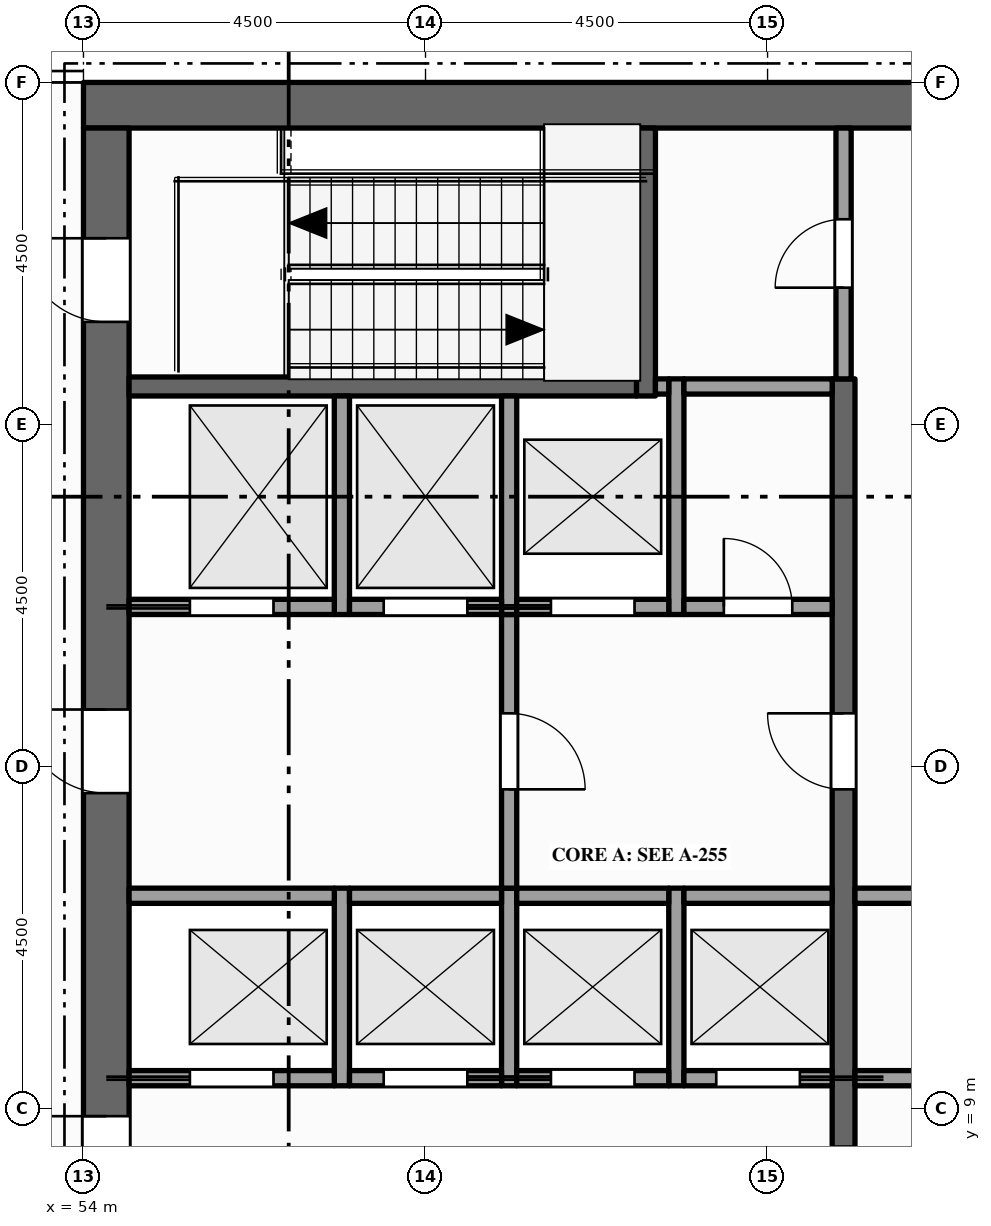
"""IFC4 building model, lengths in metres.
Left out: names, types, materials, properties, quantities, classifications, styles, units other than length and angle.
Written with IfcOpenShell. Run it as: python <this file> out.ifc"""

import sys

from ifc_helpers import new_model, si_unit, direction, frame, frame_2d, origin, place, context, subcontext, project, spatial, rectangle, extrude, element, fill, save


model = new_model("IFC4")
c1 = context("Model", 3, precision=1e-05, world=origin(), true_north=direction((0.0, 1.0)))
c2 = subcontext(c1, "Body", "Model", "MODEL_VIEW")
j1 = project(units=[si_unit("LENGTHUNIT", "METRE"), si_unit("PLANEANGLEUNIT", "RADIAN")], contexts=[c1])
p1 = place(None, origin())
s1 = spatial("IfcSite", under=j1, at=p1, CompositionType="ELEMENT")
p2 = place(p1, origin())
s2 = spatial("IfcBuilding", under=s1, at=p2, CompositionType="ELEMENT")
p3 = place(p2, frame((0.0, 0.0, 309.5)))
s3 = spatial("IfcBuildingStorey", under=s2, at=p3, CompositionType="ELEMENT", Elevation=309.5)
p4 = place(p3, frame((54.0, 22.2, -0.15), z_axis=(0.0, 0.0, 1.0), x_axis=(1.0, 0.0, 0.0)))
e1 = element("IfcWall", 1, at=p4, inside=s3, PredefinedType="SHEAR", context=c2, shape_type="SweptSolid", body=[
    extrude(rectangle(XDim=13.5, YDim=0.6, at=frame_2d((6.75, 0.0))), origin(), (0.0, 0.0, 1.0), 4.5),
])
p5 = place(p3, frame((54.3, 0.6, -0.15), z_axis=(0.0, 0.0, 1.0), x_axis=(0.0, 1.0, 0.0)))
e2 = element("IfcWall", 2, at=p5, inside=s3, PredefinedType="SHEAR", context=c2, shape_type="SweptSolid", body=[
    extrude(rectangle(XDim=21.3, YDim=0.6, at=frame_2d((10.65, 0.0))), origin(), (0.0, 0.0, 1.0), 4.5),
])
p6 = place(p5, frame((6.5, 0.0, 0.15)))
e3 = element("IfcOpeningElement", 3, at=p6, cuts=e2, PredefinedType="OPENING", context=c2, shape_type="SweptSolid", body=[
    extrude(rectangle(XDim=1.8, YDim=2.1, at=frame_2d((0.9, 1.05))), frame((0.0, 0.31, 0.0), z_axis=(0.0, -1.0, 0.0), x_axis=(1.0, 0.0, 0.0)), (0.0, 0.0, 1.0), 0.62),
])
p7 = place(p5, frame((12.55, 0.0, 0.15)))
e4 = element("IfcOpeningElement", 4, at=p7, cuts=e2, PredefinedType="OPENING", context=c2, shape_type="SweptSolid", body=[
    extrude(rectangle(XDim=1.1, YDim=2.1, at=frame_2d((0.55, 1.05))), frame((0.0, 0.31, 0.0), z_axis=(0.0, -1.0, 0.0), x_axis=(1.0, 0.0, 0.0)), (0.0, 0.0, 1.0), 0.62),
])
p8 = place(p5, frame((1.55, 0.0, 0.15)))
e5 = element("IfcOpeningElement", 5, at=p8, cuts=e2, PredefinedType="OPENING", context=c2, shape_type="SweptSolid", body=[
    extrude(rectangle(XDim=1.1, YDim=2.1, at=frame_2d((0.55, 1.05))), frame((0.0, 0.31, 0.0), z_axis=(0.0, -1.0, 0.0), x_axis=(1.0, 0.0, 0.0)), (0.0, 0.0, 1.0), 0.62),
])
p9 = place(p5, frame((18.75, 0.0, 0.15)))
e6 = element("IfcOpeningElement", 6, at=p9, cuts=e2, PredefinedType="OPENING", context=c2, shape_type="SweptSolid", body=[
    extrude(rectangle(XDim=1.1, YDim=2.1, at=frame_2d((0.55, 1.05))), frame((0.0, 0.31, 0.0), z_axis=(0.0, -1.0, 0.0), x_axis=(1.0, 0.0, 0.0)), (0.0, 0.0, 1.0), 0.62),
])
p10 = place(p3, frame((57.4, 9.3, 0.0), z_axis=(0.0, 0.0, 1.0), x_axis=(0.0, 1.0, 0.0)))
e7 = element("IfcWall", 7, at=p10, inside=s3, PredefinedType="SOLIDWALL", context=c2, shape_type="SweptSolid", body=[
    extrude(rectangle(XDim=2.6, YDim=0.2, at=frame_2d((1.3, 0.0))), origin(), (0.0, 0.0, 1.0), 4.35),
])
p11 = place(p3, frame((57.4, 15.5, 0.0), z_axis=(0.0, 0.0, 1.0), x_axis=(0.0, 1.0, 0.0)))
e8 = element("IfcWall", 8, at=p11, inside=s3, PredefinedType="SOLIDWALL", context=c2, shape_type="SweptSolid", body=[
    extrude(rectangle(XDim=2.875, YDim=0.2, at=frame_2d((1.438, 0.0))), origin(), (0.0, 0.0, 1.0), 4.35),
])
p12 = place(p3, frame((59.6, 9.3, 0.0), z_axis=(0.0, 0.0, 1.0), x_axis=(0.0, 1.0, 0.0)))
e9 = element("IfcWall", 9, at=p12, inside=s3, PredefinedType="SOLIDWALL", context=c2, shape_type="SweptSolid", body=[
    extrude(rectangle(XDim=2.6, YDim=0.2, at=frame_2d((1.3, 0.0))), origin(), (0.0, 0.0, 1.0), 4.35),
])
p13 = place(p3, frame((59.6, 11.9, 0.0), z_axis=(0.0, 0.0, 1.0), x_axis=(0.0, 1.0, 0.0)))
e10 = element("IfcWall", 10, at=p13, inside=s3, PredefinedType="PARTITIONING", context=c2, shape_type="SweptSolid", body=[
    extrude(rectangle(XDim=3.6, YDim=0.2, at=frame_2d((1.8, 0.0))), origin(), (0.0, 0.0, 1.0), 4.35),
])
p14 = place(p13, frame((1.3, 0.0, 0.0)))
e11 = element("IfcOpeningElement", 11, at=p14, cuts=e10, PredefinedType="OPENING", context=c2, shape_type="SweptSolid", body=[
    extrude(rectangle(XDim=1.0, YDim=2.1, at=frame_2d((0.5, 1.05))), frame((0.0, 0.11, 0.0), z_axis=(0.0, -1.0, 0.0), x_axis=(1.0, 0.0, 0.0)), (0.0, 0.0, 1.0), 0.22),
])
p15 = place(p3, frame((59.6, 15.5, 0.0), z_axis=(0.0, 0.0, 1.0), x_axis=(0.0, 1.0, 0.0)))
e12 = element("IfcWall", 12, at=p15, inside=s3, PredefinedType="SOLIDWALL", context=c2, shape_type="SweptSolid", body=[
    extrude(rectangle(XDim=2.875, YDim=0.2, at=frame_2d((1.438, 0.0))), origin(), (0.0, 0.0, 1.0), 4.35),
])
p16 = place(p3, frame((61.4, 18.375, 0.0), z_axis=(0.0, 0.0, 1.0), x_axis=(0.0, 1.0, 0.0)))
e13 = element("IfcWall", 13, at=p16, inside=s3, PredefinedType="SHEAR", context=c2, shape_type="SweptSolid", body=[
    extrude(rectangle(XDim=3.525, YDim=0.25, at=frame_2d((1.762, 0.0))), origin(), (0.0, 0.0, 1.0), 4.35),
])
p17 = place(p3, frame((61.8, 9.3, 0.0), z_axis=(0.0, 0.0, 1.0), x_axis=(0.0, 1.0, 0.0)))
e14 = element("IfcWall", 14, at=p17, inside=s3, PredefinedType="SOLIDWALL", context=c2, shape_type="SweptSolid", body=[
    extrude(rectangle(XDim=2.6, YDim=0.2, at=frame_2d((1.3, 0.0))), origin(), (0.0, 0.0, 1.0), 4.35),
])
p18 = place(p3, frame((61.8, 15.5, 0.0), z_axis=(0.0, 0.0, 1.0), x_axis=(0.0, 1.0, 0.0)))
e15 = element("IfcWall", 15, at=p18, inside=s3, PredefinedType="SOLIDWALL", context=c2, shape_type="SweptSolid", body=[
    extrude(rectangle(XDim=3.1, YDim=0.2, at=frame_2d((1.55, 0.0))), origin(), (0.0, 0.0, 1.0), 4.35),
])
p19 = place(p3, frame((64.0, 4.1, 0.0), z_axis=(0.0, 0.0, 1.0), x_axis=(0.0, 1.0, 0.0)))
e16 = element("IfcWall", 16, at=p19, inside=s3, PredefinedType="SHEAR", context=c2, shape_type="SweptSolid", body=[
    extrude(rectangle(XDim=14.5, YDim=0.3, at=frame_2d((7.25, 0.0))), origin(), (0.0, 0.0, 1.0), 4.35),
])
p20 = place(p19, frame((3.4, 0.0, 0.0)))
e17 = element("IfcOpeningElement", 17, at=p20, cuts=e16, PredefinedType="OPENING", context=c2, shape_type="SweptSolid", body=[
    extrude(rectangle(XDim=1.0, YDim=2.1, at=frame_2d((0.5, 1.05))), frame((0.0, 0.16, 0.0), z_axis=(0.0, -1.0, 0.0), x_axis=(1.0, 0.0, 0.0)), (0.0, 0.0, 1.0), 0.32),
])
p21 = place(p19, frame((9.1, 0.0, 0.0)))
e18 = element("IfcOpeningElement", 18, at=p21, cuts=e16, PredefinedType="OPENING", context=c2, shape_type="SweptSolid", body=[
    extrude(rectangle(XDim=1.0, YDim=2.1, at=frame_2d((0.5, 1.05))), frame((0.0, 0.16, 0.0), z_axis=(0.0, -1.0, 0.0), x_axis=(1.0, 0.0, 0.0)), (0.0, 0.0, 1.0), 0.32),
])
p22 = place(p3, frame((64.0, 18.6, 0.0), z_axis=(0.0, 0.0, 1.0), x_axis=(0.0, 1.0, 0.0)))
e19 = element("IfcWall", 19, at=p22, inside=s3, PredefinedType="PARTITIONING", context=c2, shape_type="SweptSolid", body=[
    extrude(rectangle(XDim=3.3, YDim=0.2, at=frame_2d((1.65, 0.0))), origin(), (0.0, 0.0, 1.0), 4.35),
])
p23 = place(p22, frame((1.2, 0.0, 0.0)))
e20 = element("IfcOpeningElement", 20, at=p23, cuts=e19, PredefinedType="OPENING", context=c2, shape_type="SweptSolid", body=[
    extrude(rectangle(XDim=0.9, YDim=2.1, at=frame_2d((0.45, 1.05))), frame((0.0, 0.11, 0.0), z_axis=(0.0, -1.0, 0.0), x_axis=(1.0, 0.0, 0.0)), (0.0, 0.0, 1.0), 0.22),
])
p24 = place(p3, frame((54.6, 9.4, 0.0), z_axis=(0.0, 0.0, 1.0), x_axis=(1.0, 0.0, 0.0)))
e21 = element("IfcWall", 21, at=p24, inside=s3, PredefinedType="SOLIDWALL", context=c2, shape_type="SweptSolid", body=[
    extrude(rectangle(XDim=2.7, YDim=0.2, at=frame_2d((1.35, 0.0))), origin(), (0.0, 0.0, 1.0), 4.35),
])
p25 = place(p24, frame((0.8, 0.0, 0.012)))
e22 = element("IfcOpeningElement", 22, at=p25, cuts=e21, PredefinedType="OPENING", context=c2, shape_type="SweptSolid", body=[
    extrude(rectangle(XDim=1.1, YDim=2.1, at=frame_2d((0.55, 1.05))), frame((0.0, 0.11, 0.0), z_axis=(0.0, -1.0, 0.0), x_axis=(1.0, 0.0, 0.0)), (0.0, 0.0, 1.0), 0.22),
])
p26 = place(p3, frame((57.5, 9.4, 0.0), z_axis=(0.0, 0.0, 1.0), x_axis=(1.0, 0.0, 0.0)))
e23 = element("IfcWall", 23, at=p26, inside=s3, PredefinedType="SOLIDWALL", context=c2, shape_type="SweptSolid", body=[
    extrude(rectangle(XDim=2.0, YDim=0.2, at=frame_2d((1.0, 0.0))), origin(), (0.0, 0.0, 1.0), 4.35),
])
p27 = place(p26, frame((0.45, 0.0, 0.012)))
e24 = element("IfcOpeningElement", 24, at=p27, cuts=e23, PredefinedType="OPENING", context=c2, shape_type="SweptSolid", body=[
    extrude(rectangle(XDim=1.1, YDim=2.1, at=frame_2d((0.55, 1.05))), frame((0.0, 0.11, 0.0), z_axis=(0.0, -1.0, 0.0), x_axis=(1.0, 0.0, 0.0)), (0.0, 0.0, 1.0), 0.22),
])
p28 = place(p3, frame((59.7, 9.4, 0.0), z_axis=(0.0, 0.0, 1.0), x_axis=(1.0, 0.0, 0.0)))
e25 = element("IfcWall", 25, at=p28, inside=s3, PredefinedType="SOLIDWALL", context=c2, shape_type="SweptSolid", body=[
    extrude(rectangle(XDim=2.0, YDim=0.2, at=frame_2d((1.0, 0.0))), origin(), (0.0, 0.0, 1.0), 4.35),
])
p29 = place(p28, frame((0.45, 0.0, 0.012)))
e26 = element("IfcOpeningElement", 26, at=p29, cuts=e25, PredefinedType="OPENING", context=c2, shape_type="SweptSolid", body=[
    extrude(rectangle(XDim=1.1, YDim=2.1, at=frame_2d((0.55, 1.05))), frame((0.0, 0.11, 0.0), z_axis=(0.0, -1.0, 0.0), x_axis=(1.0, 0.0, 0.0)), (0.0, 0.0, 1.0), 0.22),
])
p30 = place(p3, frame((61.9, 9.4, 0.0), z_axis=(0.0, 0.0, 1.0), x_axis=(1.0, 0.0, 0.0)))
e27 = element("IfcWall", 27, at=p30, inside=s3, PredefinedType="SOLIDWALL", context=c2, shape_type="SweptSolid", body=[
    extrude(rectangle(XDim=1.95, YDim=0.2, at=frame_2d((0.975, 0.0))), origin(), (0.0, 0.0, 1.0), 4.35),
])
p31 = place(p30, frame((0.425, 0.0, 0.012)))
e28 = element("IfcOpeningElement", 28, at=p31, cuts=e27, PredefinedType="OPENING", context=c2, shape_type="SweptSolid", body=[
    extrude(rectangle(XDim=1.1, YDim=2.1, at=frame_2d((0.55, 1.05))), frame((0.0, 0.11, 0.0), z_axis=(0.0, -1.0, 0.0), x_axis=(1.0, 0.0, 0.0)), (0.0, 0.0, 1.0), 0.22),
])
p32 = place(p3, frame((64.15, 9.4, 0.0), z_axis=(0.0, 0.0, 1.0), x_axis=(1.0, 0.0, 0.0)))
e29 = element("IfcWall", 29, at=p32, inside=s3, PredefinedType="PARTITIONING", context=c2, shape_type="SweptSolid", body=[
    extrude(rectangle(XDim=2.75, YDim=0.2, at=frame_2d((1.375, 0.0))), origin(), (0.0, 0.0, 1.0), 4.35),
])
p33 = place(p32, frame((0.925, 0.0, 0.0)))
e30 = element("IfcOpeningElement", 30, at=p33, cuts=e29, PredefinedType="OPENING", context=c2, shape_type="SweptSolid", body=[
    extrude(rectangle(XDim=0.9, YDim=2.1, at=frame_2d((0.45, 1.05))), frame((0.0, 0.11, 0.0), z_axis=(0.0, -1.0, 0.0), x_axis=(1.0, 0.0, 0.0)), (0.0, 0.0, 1.0), 0.22),
])
p34 = place(p3, frame((54.6, 11.8, 0.0), z_axis=(0.0, 0.0, 1.0), x_axis=(1.0, 0.0, 0.0)))
e31 = element("IfcWall", 31, at=p34, inside=s3, PredefinedType="SOLIDWALL", context=c2, shape_type="SweptSolid", body=[
    extrude(rectangle(XDim=2.7, YDim=0.2, at=frame_2d((1.35, 0.0))), origin(), (0.0, 0.0, 1.0), 4.35),
])
for number, where, z_axis, x_axis in (
    (32, (57.5, 11.8, 0.0), (0.0, 0.0, 1.0), (1.0, 0.0, 0.0)),
    (33, (59.7, 11.8, 0.0), (0.0, 0.0, 1.0), (1.0, 0.0, 0.0)),
):
    element("IfcWall", number, at=place(p3, frame(where, z_axis=z_axis, x_axis=x_axis)), inside=s3, PredefinedType="SOLIDWALL", context=c2, shape_type="SweptSolid", body=[
        extrude(rectangle(XDim=2.0, YDim=0.2, at=frame_2d((1.0, 0.0))), origin(), (0.0, 0.0, 1.0), 4.35),
    ])
p35 = place(p3, frame((61.9, 11.8, 0.0), z_axis=(0.0, 0.0, 1.0), x_axis=(1.0, 0.0, 0.0)))
e34 = element("IfcWall", 34, at=p35, inside=s3, PredefinedType="SOLIDWALL", context=c2, shape_type="SweptSolid", body=[
    extrude(rectangle(XDim=1.95, YDim=0.2, at=frame_2d((0.975, 0.0))), origin(), (0.0, 0.0, 1.0), 4.35),
])
p36 = place(p3, frame((64.15, 11.8, 0.0), z_axis=(0.0, 0.0, 1.0), x_axis=(1.0, 0.0, 0.0)))
e35 = element("IfcWall", 35, at=p36, inside=s3, PredefinedType="PARTITIONING", context=c2, shape_type="SweptSolid", body=[
    extrude(rectangle(XDim=2.75, YDim=0.2, at=frame_2d((1.375, 0.0))), origin(), (0.0, 0.0, 1.0), 4.35),
])
p37 = place(p3, frame((54.6, 15.6, 0.0), z_axis=(0.0, 0.0, 1.0), x_axis=(1.0, 0.0, 0.0)))
e36 = element("IfcWall", 36, at=p37, inside=s3, PredefinedType="SOLIDWALL", context=c2, shape_type="SweptSolid", body=[
    extrude(rectangle(XDim=2.7, YDim=0.2, at=frame_2d((1.35, 0.0))), origin(), (0.0, 0.0, 1.0), 4.35),
])
p38 = place(p37, frame((0.8, 0.0, 0.012)))
e37 = element("IfcOpeningElement", 37, at=p38, cuts=e36, PredefinedType="OPENING", context=c2, shape_type="SweptSolid", body=[
    extrude(rectangle(XDim=1.1, YDim=2.1, at=frame_2d((0.55, 1.05))), frame((0.0, 0.11, 0.0), z_axis=(0.0, -1.0, 0.0), x_axis=(1.0, 0.0, 0.0)), (0.0, 0.0, 1.0), 0.22),
])
p39 = place(p3, frame((57.5, 15.6, 0.0), z_axis=(0.0, 0.0, 1.0), x_axis=(1.0, 0.0, 0.0)))
e38 = element("IfcWall", 38, at=p39, inside=s3, PredefinedType="SOLIDWALL", context=c2, shape_type="SweptSolid", body=[
    extrude(rectangle(XDim=2.0, YDim=0.2, at=frame_2d((1.0, 0.0))), origin(), (0.0, 0.0, 1.0), 4.35),
])
p40 = place(p39, frame((0.45, 0.0, 0.012)))
e39 = element("IfcOpeningElement", 39, at=p40, cuts=e38, PredefinedType="OPENING", context=c2, shape_type="SweptSolid", body=[
    extrude(rectangle(XDim=1.1, YDim=2.1, at=frame_2d((0.55, 1.05))), frame((0.0, 0.11, 0.0), z_axis=(0.0, -1.0, 0.0), x_axis=(1.0, 0.0, 0.0)), (0.0, 0.0, 1.0), 0.22),
])
p41 = place(p3, frame((59.7, 15.6, 0.0), z_axis=(0.0, 0.0, 1.0), x_axis=(1.0, 0.0, 0.0)))
e40 = element("IfcWall", 40, at=p41, inside=s3, PredefinedType="SOLIDWALL", context=c2, shape_type="SweptSolid", body=[
    extrude(rectangle(XDim=2.0, YDim=0.2, at=frame_2d((1.0, 0.0))), origin(), (0.0, 0.0, 1.0), 4.35),
])
p42 = place(p41, frame((0.45, 0.0, 0.012)))
e41 = element("IfcOpeningElement", 41, at=p42, cuts=e40, PredefinedType="OPENING", context=c2, shape_type="SweptSolid", body=[
    extrude(rectangle(XDim=1.1, YDim=2.1, at=frame_2d((0.55, 1.05))), frame((0.0, 0.11, 0.0), z_axis=(0.0, -1.0, 0.0), x_axis=(1.0, 0.0, 0.0)), (0.0, 0.0, 1.0), 0.22),
])
p43 = place(p3, frame((61.9, 15.6, 0.0), z_axis=(0.0, 0.0, 1.0), x_axis=(1.0, 0.0, 0.0)))
e42 = element("IfcWall", 42, at=p43, inside=s3, PredefinedType="PARTITIONING", context=c2, shape_type="SweptSolid", body=[
    extrude(rectangle(XDim=1.95, YDim=0.2, at=frame_2d((0.975, 0.0))), origin(), (0.0, 0.0, 1.0), 4.35),
])
p44 = place(p43, frame((0.525, 0.0, 0.0)))
e43 = element("IfcOpeningElement", 43, at=p44, cuts=e42, PredefinedType="OPENING", context=c2, shape_type="SweptSolid", body=[
    extrude(rectangle(XDim=0.9, YDim=2.1, at=frame_2d((0.45, 1.05))), frame((0.0, 0.11, 0.0), z_axis=(0.0, -1.0, 0.0), x_axis=(1.0, 0.0, 0.0)), (0.0, 0.0, 1.0), 0.22),
])
p45 = place(p3, frame((54.6, 18.5, 0.0), z_axis=(0.0, 0.0, 1.0), x_axis=(1.0, 0.0, 0.0)))
e44 = element("IfcWall", 44, at=p45, inside=s3, PredefinedType="SHEAR", context=c2, shape_type="SweptSolid", body=[
    extrude(rectangle(XDim=6.675, YDim=0.25, at=frame_2d((3.337, 0.0))), origin(), (0.0, 0.0, 1.0), 4.35),
])
p46 = place(p3, frame((61.525, 18.5, 0.0), z_axis=(0.0, 0.0, 1.0), x_axis=(1.0, 0.0, 0.0)))
e45 = element("IfcWall", 45, at=p46, inside=s3, PredefinedType="SOLIDWALL", context=c2, shape_type="SweptSolid", body=[
    extrude(rectangle(XDim=0.175, YDim=0.2, at=frame_2d((0.087, 0.0))), origin(), (0.0, 0.0, 1.0), 4.35),
])
p47 = place(p3, frame((61.9, 18.5, 0.0), z_axis=(0.0, 0.0, 1.0), x_axis=(1.0, 0.0, 0.0)))
e46 = element("IfcWall", 46, at=p47, inside=s3, PredefinedType="PARTITIONING", context=c2, shape_type="SweptSolid", body=[
    extrude(rectangle(XDim=1.95, YDim=0.2, at=frame_2d((0.975, 0.0))), origin(), (0.0, 0.0, 1.0), 4.35),
])
p48 = place(p25, origin())
e47 = element("IfcDoor", 47, at=p48, inside=s3, OperationType="SLIDING_TO_LEFT", PredefinedType="DOOR", context=c2, shape_type="SweptSolid", body=[
    extrude(rectangle(XDim=1.1, YDim=2.1, at=frame_2d((0.55, 1.05))), frame((0.0, 0.025, 0.0), z_axis=(0.0, -1.0, 0.0), x_axis=(1.0, 0.0, 0.0)), (0.0, 0.0, 1.0), 0.05),
])
fill(e22, e47)
p49 = place(p27, origin())
e48 = element("IfcDoor", 48, at=p49, inside=s3, OperationType="SLIDING_TO_RIGHT", PredefinedType="DOOR", context=c2, shape_type="SweptSolid", body=[
    extrude(rectangle(XDim=1.1, YDim=2.1, at=frame_2d((0.55, 1.05))), frame((0.0, 0.025, 0.0), z_axis=(0.0, -1.0, 0.0), x_axis=(1.0, 0.0, 0.0)), (0.0, 0.0, 1.0), 0.05),
])
fill(e24, e48)
p50 = place(p29, origin())
e49 = element("IfcDoor", 49, at=p50, inside=s3, OperationType="SLIDING_TO_LEFT", PredefinedType="DOOR", context=c2, shape_type="SweptSolid", body=[
    extrude(rectangle(XDim=1.1, YDim=2.1, at=frame_2d((0.55, 1.05))), frame((0.0, 0.025, 0.0), z_axis=(0.0, -1.0, 0.0), x_axis=(1.0, 0.0, 0.0)), (0.0, 0.0, 1.0), 0.05),
])
fill(e26, e49)
p51 = place(p31, origin())
e50 = element("IfcDoor", 50, at=p51, inside=s3, OperationType="SLIDING_TO_RIGHT", PredefinedType="DOOR", context=c2, shape_type="SweptSolid", body=[
    extrude(rectangle(XDim=1.1, YDim=2.1, at=frame_2d((0.55, 1.05))), frame((0.0, 0.025, 0.0), z_axis=(0.0, -1.0, 0.0), x_axis=(1.0, 0.0, 0.0)), (0.0, 0.0, 1.0), 0.05),
])
fill(e28, e50)
p52 = place(p38, origin())
e51 = element("IfcDoor", 51, at=p52, inside=s3, OperationType="SLIDING_TO_LEFT", PredefinedType="DOOR", context=c2, shape_type="SweptSolid", body=[
    extrude(rectangle(XDim=1.1, YDim=2.1, at=frame_2d((0.55, 1.05))), frame((0.0, 0.025, 0.0), z_axis=(0.0, -1.0, 0.0), x_axis=(1.0, 0.0, 0.0)), (0.0, 0.0, 1.0), 0.05),
])
fill(e37, e51)
p53 = place(p40, origin())
e52 = element("IfcDoor", 52, at=p53, inside=s3, OperationType="SLIDING_TO_RIGHT", PredefinedType="DOOR", context=c2, shape_type="SweptSolid", body=[
    extrude(rectangle(XDim=1.1, YDim=2.1, at=frame_2d((0.55, 1.05))), frame((0.0, 0.025, 0.0), z_axis=(0.0, -1.0, 0.0), x_axis=(1.0, 0.0, 0.0)), (0.0, 0.0, 1.0), 0.05),
])
fill(e39, e52)
p54 = place(p42, origin())
e53 = element("IfcDoor", 53, at=p54, inside=s3, OperationType="SLIDING_TO_LEFT", PredefinedType="DOOR", context=c2, shape_type="SweptSolid", body=[
    extrude(rectangle(XDim=1.1, YDim=2.1, at=frame_2d((0.55, 1.05))), frame((0.0, 0.025, 0.0), z_axis=(0.0, -1.0, 0.0), x_axis=(1.0, 0.0, 0.0)), (0.0, 0.0, 1.0), 0.05),
])
fill(e41, e53)
p55 = place(p6, origin())
e54 = element("IfcDoor", 54, at=p55, inside=s3, OperationType="DOUBLE_DOOR_SINGLE_SWING", PredefinedType="DOOR", context=c2, shape_type="SweptSolid", body=[
    extrude(rectangle(XDim=1.8, YDim=2.1, at=frame_2d((0.9, 1.05))), frame((0.0, 0.025, 0.0), z_axis=(0.0, -1.0, 0.0), x_axis=(1.0, 0.0, 0.0)), (0.0, 0.0, 1.0), 0.05),
])
fill(e3, e54)
p56 = place(p7, origin())
e55 = element("IfcDoor", 55, at=p56, inside=s3, OperationType="SINGLE_SWING_RIGHT", PredefinedType="DOOR", context=c2, shape_type="SweptSolid", body=[
    extrude(rectangle(XDim=1.1, YDim=2.1, at=frame_2d((0.55, 1.05))), frame((0.0, 0.025, 0.0), z_axis=(0.0, -1.0, 0.0), x_axis=(1.0, 0.0, 0.0)), (0.0, 0.0, 1.0), 0.05),
])
fill(e4, e55)
p57 = place(p14, origin())
e56 = element("IfcDoor", 56, at=p57, inside=s3, OperationType="SINGLE_SWING_LEFT", PredefinedType="DOOR", context=c2, shape_type="SweptSolid", body=[
    extrude(rectangle(XDim=1.0, YDim=2.1, at=frame_2d((0.5, 1.05))), frame((0.0, 0.025, 0.0), z_axis=(0.0, -1.0, 0.0), x_axis=(1.0, 0.0, 0.0)), (0.0, 0.0, 1.0), 0.05),
])
fill(e11, e56)
p58 = place(p21, origin())
e57 = element("IfcDoor", 57, at=p58, inside=s3, OperationType="SINGLE_SWING_RIGHT", PredefinedType="DOOR", context=c2, shape_type="SweptSolid", body=[
    extrude(rectangle(XDim=1.0, YDim=2.1, at=frame_2d((0.5, 1.05))), frame((0.0, 0.025, 0.0), z_axis=(0.0, -1.0, 0.0), x_axis=(1.0, 0.0, 0.0)), (0.0, 0.0, 1.0), 0.05),
])
fill(e18, e57)
p59 = place(p9, origin())
e58 = element("IfcDoor", 58, at=p59, inside=s3, OperationType="SINGLE_SWING_RIGHT", PredefinedType="DOOR", context=c2, shape_type="SweptSolid", body=[
    extrude(rectangle(XDim=1.1, YDim=2.1, at=frame_2d((0.55, 1.05))), frame((0.0, 0.025, 0.0), z_axis=(0.0, -1.0, 0.0), x_axis=(1.0, 0.0, 0.0)), (0.0, 0.0, 1.0), 0.05),
])
fill(e6, e58)
p60 = place(p23, origin())
e59 = element("IfcDoor", 59, at=p60, inside=s3, OperationType="SINGLE_SWING_LEFT", PredefinedType="DOOR", context=c2, shape_type="SweptSolid", body=[
    extrude(rectangle(XDim=0.9, YDim=2.1, at=frame_2d((0.45, 1.05))), frame((0.0, 0.025, 0.0), z_axis=(0.0, -1.0, 0.0), x_axis=(1.0, 0.0, 0.0)), (0.0, 0.0, 1.0), 0.05),
])
fill(e20, e59)
p61 = place(p44, origin())
e60 = element("IfcDoor", 60, at=p61, inside=s3, OperationType="SINGLE_SWING_LEFT", PredefinedType="DOOR", context=c2, shape_type="SweptSolid", body=[
    extrude(rectangle(XDim=0.9, YDim=2.1, at=frame_2d((0.45, 1.05))), frame((0.0, 0.025, 0.0), z_axis=(0.0, -1.0, 0.0), x_axis=(1.0, 0.0, 0.0)), (0.0, 0.0, 1.0), 0.05),
])
fill(e43, e60)
save(model, sys.argv[1])
